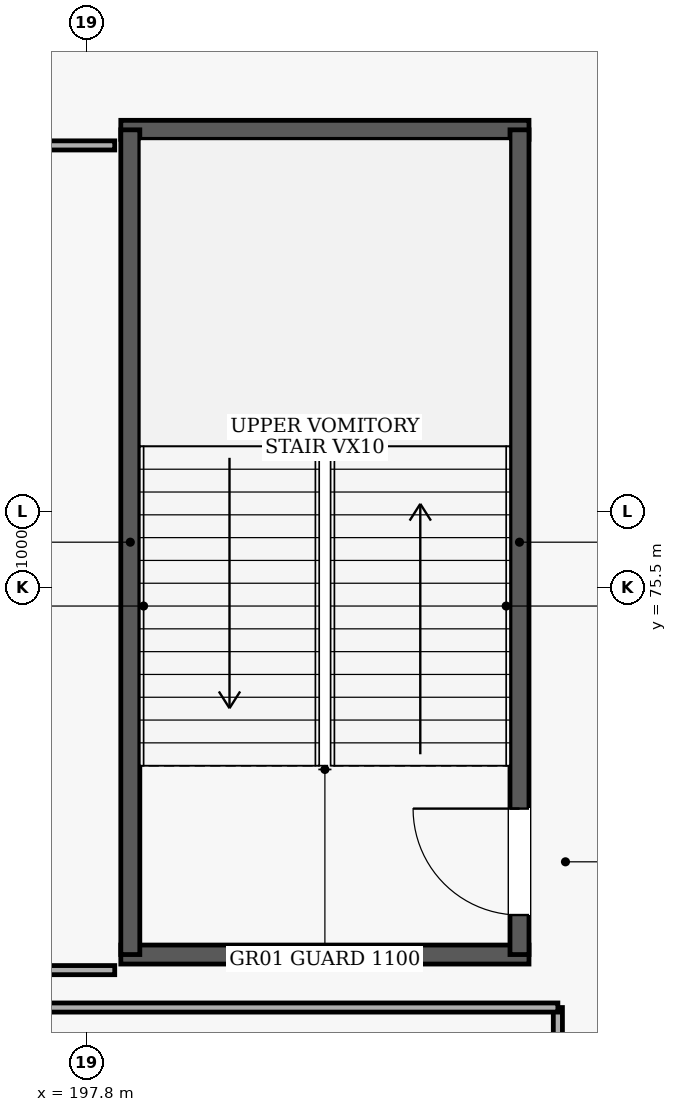
"""IFC4 building model, lengths in metres.
Left out: names, types, materials, properties, quantities, classifications, styles, units other than length and angle.
Written with IfcOpenShell. Run it as: python <this file> out.ifc"""

import sys

from ifc_helpers import new_model, si_unit, direction, frame, frame_2d, origin, place, context, subcontext, project, spatial, rectangle, extrude, element, fill, save


model = new_model("IFC4")
c1 = context("Model", 3, precision=1e-05, world=origin(), true_north=direction((0.0, 1.0)))
c2 = subcontext(c1, "Body", "Model", "MODEL_VIEW")
j1 = project(units=[si_unit("LENGTHUNIT", "METRE"), si_unit("PLANEANGLEUNIT", "RADIAN")], contexts=[c1])
p1 = place(None, origin())
s1 = spatial("IfcSite", under=j1, at=p1, CompositionType="ELEMENT")
p2 = place(p1, origin())
s2 = spatial("IfcBuilding", under=s1, at=p2, CompositionType="ELEMENT")
p3 = place(p2, frame((0.0, 0.0, 5.4)))
s3 = spatial("IfcBuildingStorey", under=s2, at=p3, CompositionType="ELEMENT", Elevation=5.4)
for number, where, z_axis, x_axis in (
    (1, (198.25, 70.675, 0.0), (0.0, 0.0, 1.0), (1.0, 0.0, 0.0)),
    (2, (203.62, 81.525, 0.0), (0.0, 0.0, 1.0), (-1.0, 0.0, 0.0)),
):
    element("IfcWall", number, at=place(p3, frame(where, z_axis=z_axis, x_axis=x_axis)), inside=s3, PredefinedType="SHEAR", context=c2, shape_type="SweptSolid", body=[
        extrude(rectangle(XDim=5.37, YDim=0.25, at=frame_2d((2.685, 0.0))), origin(), (0.0, 0.0, 1.0), 4.5),
    ])
p4 = place(p3, frame((198.375, 70.675, 0.0), z_axis=(0.0, 0.0, 1.0), x_axis=(0.0, 1.0, 0.0)))
e3 = element("IfcWall", 3, at=p4, inside=s3, PredefinedType="SHEAR", context=c2, shape_type="SweptSolid", body=[
    extrude(rectangle(XDim=10.85, YDim=0.25, at=frame_2d((5.425, 0.0))), origin(), (0.0, 0.0, 1.0), 4.5),
])
p5 = place(p3, frame((203.495, 70.675, 0.0), z_axis=(0.0, 0.0, 1.0), x_axis=(0.0, 1.0, 0.0)))
e4 = element("IfcWall", 4, at=p5, inside=s3, PredefinedType="SHEAR", context=c2, shape_type="SweptSolid", body=[
    extrude(rectangle(XDim=10.85, YDim=0.25, at=frame_2d((5.425, 0.0))), origin(), (0.0, 0.0, 1.0), 4.5),
])
p6 = place(p5, frame((0.52, 0.0, 0.0)))
e5 = element("IfcOpeningElement", 5, at=p6, cuts=e4, PredefinedType="OPENING", context=c2, shape_type="SweptSolid", body=[
    extrude(rectangle(XDim=1.4, YDim=2.15, at=frame_2d((0.7, 1.075))), frame((0.0, 0.135, 0.0), z_axis=(0.0, -1.0, 0.0), x_axis=(1.0, 0.0, 0.0)), (0.0, 0.0, 1.0), 0.27),
])
p7 = place(p3, frame((204.0, 67.33, 0.0), z_axis=(0.0, 0.0, 1.0), x_axis=(0.0, 1.0, 0.0)))
e6 = element("IfcWall", 6, at=p7, inside=s3, PredefinedType="PARTITIONING", context=c2, shape_type="SweptSolid", body=[
    extrude(rectangle(XDim=2.648, YDim=0.12, at=frame_2d((1.324, 0.0))), origin(), (0.0, 0.0, 1.0), 4.5),
])
p8 = place(p7, frame((0.844, 0.0, 0.0)))
e7 = element("IfcOpeningElement", 7, at=p8, cuts=e6, PredefinedType="OPENING", context=c2, shape_type="SweptSolid", body=[
    extrude(rectangle(XDim=0.96, YDim=2.1, at=frame_2d((0.48, 1.05))), frame((0.0, 0.07, 0.0), z_axis=(0.0, -1.0, 0.0), x_axis=(1.0, 0.0, 0.0)), (0.0, 0.0, 1.0), 0.14),
])
p9 = place(p3, frame((204.0, 69.978, 0.0), z_axis=(0.0, 0.0, 1.0), x_axis=(-1.0, 0.0, 0.0)))
e8 = element("IfcWall", 8, at=p9, inside=s3, PredefinedType="PARTITIONING", context=c2, shape_type="SweptSolid", body=[
    extrude(rectangle(XDim=28.4, YDim=0.12, at=frame_2d((14.2, 0.0))), origin(), (0.0, 0.0, 1.0), 4.5),
])
p10 = place(p3, frame((175.6, 70.47, 0.0), z_axis=(0.0, 0.0, 1.0), x_axis=(1.0, 0.0, 0.0)))
e9 = element("IfcWall", 9, at=p10, inside=s3, PredefinedType="PARTITIONING", context=c2, shape_type="SweptSolid", body=[
    extrude(rectangle(XDim=22.57, YDim=0.12, at=frame_2d((11.285, 0.0))), origin(), (0.0, 0.0, 1.0), 4.5),
])
p11 = place(p3, frame((198.17, 81.32, 0.0), z_axis=(0.0, 0.0, 1.0), x_axis=(-1.0, 0.0, 0.0)))
e10 = element("IfcWall", 10, at=p11, inside=s3, PredefinedType="PARTITIONING", context=c2, shape_type="SweptSolid", body=[
    extrude(rectangle(XDim=22.57, YDim=0.12, at=frame_2d((11.285, 0.0))), origin(), (0.0, 0.0, 1.0), 4.5),
])
p12 = place(p11, frame((10.825, 0.0, 0.0)))
e11 = element("IfcOpeningElement", 11, at=p12, cuts=e10, PredefinedType="OPENING", context=c2, shape_type="SweptSolid", body=[
    extrude(rectangle(XDim=0.92, YDim=2.1, at=frame_2d((0.46, 1.05))), frame((0.0, 0.07, 0.0), z_axis=(0.0, -1.0, 0.0), x_axis=(1.0, 0.0, 0.0)), (0.0, 0.0, 1.0), 0.14),
])
p13 = place(p6, origin())
e12 = element("IfcDoor", 12, at=p13, inside=s3, OperationType="SINGLE_SWING_RIGHT", PredefinedType="DOOR", context=c2, shape_type="SweptSolid", body=[
    extrude(rectangle(XDim=1.4, YDim=2.15, at=frame_2d((0.7, 1.075))), frame((0.0, 0.025, 0.0), z_axis=(0.0, -1.0, 0.0), x_axis=(1.0, 0.0, 0.0)), (0.0, 0.0, 1.0), 0.05),
])
fill(e5, e12)
save(model, sys.argv[1])
